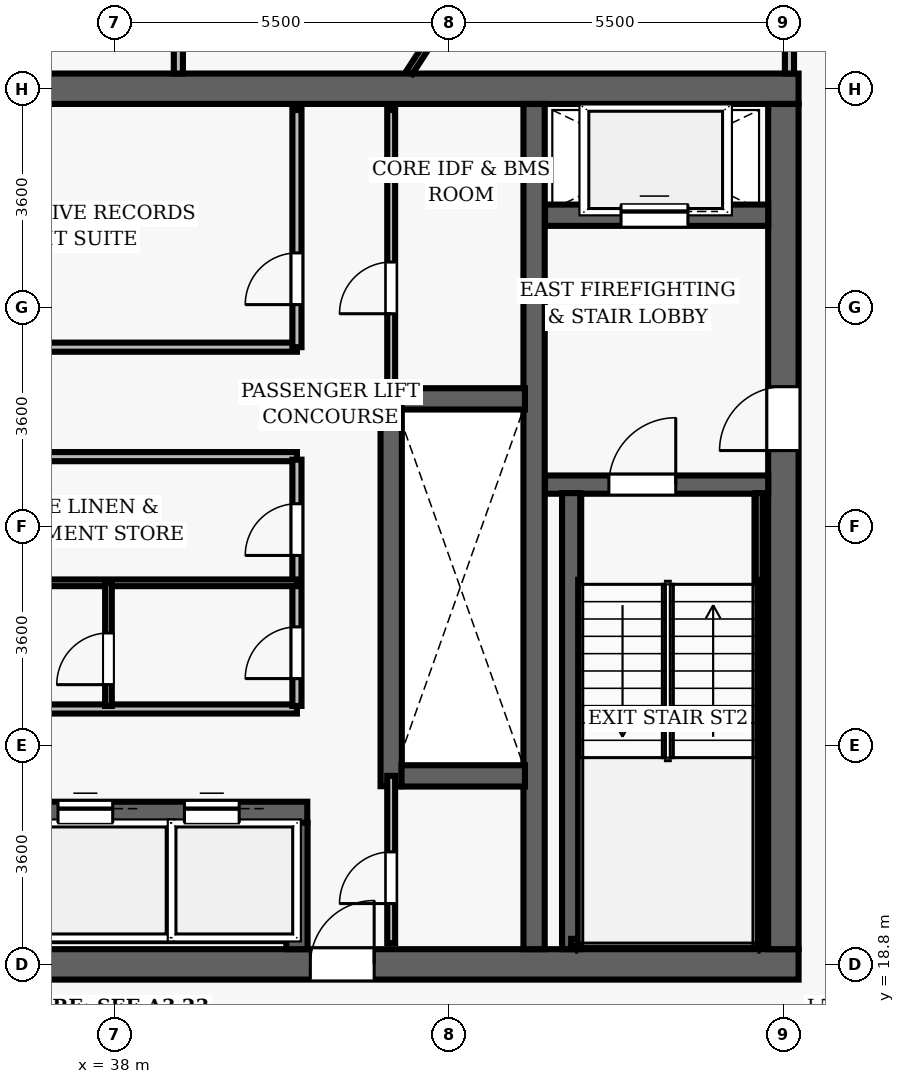
"""IFC4 building model, lengths in metres.
Left out: names, types, materials, properties, quantities, classifications, styles, units other than length and angle.
Written with IfcOpenShell. Run it as: python <this file> out.ifc"""

import sys

from ifc_helpers import new_model, si_unit, direction, frame, frame_2d, origin, place, context, subcontext, project, spatial, rectangle, extrude, element, fill, save


model = new_model("IFC4")
c1 = context("Model", 3, precision=1e-05, world=origin(), true_north=direction((0.0, 1.0)))
c2 = subcontext(c1, "Body", "Model", "MODEL_VIEW")
j1 = project(units=[si_unit("LENGTHUNIT", "METRE"), si_unit("PLANEANGLEUNIT", "RADIAN")], contexts=[c1])
p1 = place(None, origin())
s1 = spatial("IfcSite", under=j1, at=p1, CompositionType="ELEMENT")
p2 = place(p1, origin())
s2 = spatial("IfcBuilding", under=s1, at=p2, CompositionType="ELEMENT")
p3 = place(p2, frame((0.0, 0.0, 217.4)))
s3 = spatial("IfcBuildingStorey", under=s2, at=p3, CompositionType="ELEMENT", Elevation=217.4)
p4 = place(p3, frame((26.75, 18.8, 0.0), z_axis=(0.0, 0.0, 1.0), x_axis=(1.0, 0.0, 0.0)))
e1 = element("IfcWall", 1, at=p4, inside=s3, PredefinedType="SHEAR", context=c2, shape_type="SweptSolid", body=[
    extrude(rectangle(XDim=22.5, YDim=0.5, at=frame_2d((11.25, 0.0))), origin(), (0.0, 0.0, 1.0), 3.85),
])
p5 = place(p4, frame((14.47, 0.0, 0.0)))
e2 = element("IfcOpeningElement", 2, at=p5, cuts=e1, PredefinedType="OPENING", context=c2, shape_type="SweptSolid", body=[
    extrude(rectangle(XDim=1.05, YDim=2.15, at=frame_2d((0.525, 1.075))), frame((0.0, 0.26, 0.0), z_axis=(0.0, -1.0, 0.0), x_axis=(1.0, 0.0, 0.0)), (0.0, 0.0, 1.0), 0.52),
])
p6 = place(p3, frame((26.75, 33.2, 0.0), z_axis=(0.0, 0.0, 1.0), x_axis=(1.0, 0.0, 0.0)))
e3 = element("IfcWall", 3, at=p6, inside=s3, PredefinedType="SHEAR", context=c2, shape_type="SweptSolid", body=[
    extrude(rectangle(XDim=22.5, YDim=0.5, at=frame_2d((11.25, 0.0))), origin(), (0.0, 0.0, 1.0), 3.85),
])
p7 = place(p3, frame((49.0, 19.05, 0.0), z_axis=(0.0, 0.0, 1.0), x_axis=(0.0, 1.0, 0.0)))
e4 = element("IfcWall", 4, at=p7, inside=s3, PredefinedType="SHEAR", context=c2, shape_type="SweptSolid", body=[
    extrude(rectangle(XDim=13.9, YDim=0.5, at=frame_2d((6.95, 0.0))), origin(), (0.0, 0.0, 1.0), 3.85),
])
p8 = place(p7, frame((8.2, 0.0, 0.0)))
e5 = element("IfcOpeningElement", 5, at=p8, cuts=e4, PredefinedType="OPENING", context=c2, shape_type="SweptSolid", body=[
    extrude(rectangle(XDim=1.05, YDim=2.15, at=frame_2d((0.525, 1.075))), frame((0.0, 0.26, 0.0), z_axis=(0.0, -1.0, 0.0), x_axis=(1.0, 0.0, 0.0)), (0.0, 0.0, 1.0), 0.52),
])
p9 = place(p3, frame((44.9, 19.05, 0.0), z_axis=(0.0, 0.0, 1.0), x_axis=(0.0, 1.0, 0.0)))
e6 = element("IfcWall", 6, at=p9, inside=s3, PredefinedType="SHEAR", context=c2, shape_type="SweptSolid", body=[
    extrude(rectangle(XDim=13.9, YDim=0.35, at=frame_2d((6.95, 0.0))), origin(), (0.0, 0.0, 1.0), 3.85),
])
p10 = place(p3, frame((45.08, 26.69, 0.0), z_axis=(0.0, 0.0, 1.0), x_axis=(1.0, 0.0, 0.0)))
e7 = element("IfcWall", 7, at=p10, inside=s3, PredefinedType="SHEAR", context=c2, shape_type="SweptSolid", body=[
    extrude(rectangle(XDim=3.67, YDim=0.3, at=frame_2d((1.835, 0.0))), origin(), (0.0, 0.0, 1.0), 3.85),
])
p11 = place(p10, frame((1.05, 0.0, 0.0)))
e8 = element("IfcOpeningElement", 8, at=p11, cuts=e7, PredefinedType="OPENING", context=c2, shape_type="SweptSolid", body=[
    extrude(rectangle(XDim=1.1, YDim=2.15, at=frame_2d((0.55, 1.075))), frame((0.0, 0.16, 0.0), z_axis=(0.0, -1.0, 0.0), x_axis=(1.0, 0.0, 0.0)), (0.0, 0.0, 1.0), 0.32),
])
p12 = place(p3, frame((45.51, 19.05, 0.0), z_axis=(0.0, 0.0, 1.0), x_axis=(0.0, 1.0, 0.0)))
e9 = element("IfcWall", 9, at=p12, inside=s3, PredefinedType="SHEAR", context=c2, shape_type="SweptSolid", body=[
    extrude(rectangle(XDim=7.5, YDim=0.3, at=frame_2d((3.75, 0.0))), origin(), (0.0, 0.0, 1.0), 3.85),
])
p13 = place(p3, frame((48.605, 19.1, 0.0), z_axis=(0.0, 0.0, 1.0), x_axis=(0.0, 1.0, 0.0)))
e10 = element("IfcWall", 10, at=p13, inside=s3, PredefinedType="SHEAR", context=c2, shape_type="SweptSolid", body=[
    extrude(rectangle(XDim=7.45, YDim=0.12, at=frame_2d((3.725, 0.0))), origin(), (0.0, 0.0, 1.0), 3.85),
])
p14 = place(p3, frame((45.51, 19.16, 0.0), z_axis=(0.0, 0.0, 1.0), x_axis=(1.0, 0.0, 0.0)))
e11 = element("IfcWall", 11, at=p14, inside=s3, PredefinedType="SHEAR", context=c2, shape_type="SweptSolid", body=[
    extrude(rectangle(XDim=3.095, YDim=0.12, at=frame_2d((1.547, 0.0))), origin(), (0.0, 0.0, 1.0), 3.85),
])
p15 = place(p3, frame((45.08, 31.12, 0.0), z_axis=(0.0, 0.0, 1.0), x_axis=(1.0, 0.0, 0.0)))
e12 = element("IfcWall", 12, at=p15, inside=s3, PredefinedType="SHEAR", context=c2, shape_type="SweptSolid", body=[
    extrude(rectangle(XDim=3.67, YDim=0.35, at=frame_2d((1.835, 0.0))), origin(), (0.0, 0.0, 1.0), 3.035),
])
p16 = place(p15, frame((1.25, 0.0, 0.0)))
e13 = element("IfcOpeningElement", 13, at=p16, cuts=e12, PredefinedType="OPENING", context=c2, shape_type="SweptSolid", body=[
    extrude(rectangle(XDim=1.1, YDim=2.15, at=frame_2d((0.55, 1.075))), frame((0.0, 0.185, 0.0), z_axis=(0.0, -1.0, 0.0), x_axis=(1.0, 0.0, 0.0)), (0.0, 0.0, 1.0), 0.37),
])
p17 = place(p3, frame((42.55, 21.73, 0.0), z_axis=(0.0, 0.0, 1.0), x_axis=(0.0, 1.0, 0.0)))
e14 = element("IfcWall", 14, at=p17, inside=s3, PredefinedType="SHEAR", context=c2, shape_type="SweptSolid", body=[
    extrude(rectangle(XDim=6.54, YDim=0.35, at=frame_2d((3.27, 0.0))), origin(), (0.0, 0.0, 1.0), 3.035),
])
for number, where, z_axis, x_axis in (
    (15, (42.72, 21.9, 0.0), (0.0, 0.0, 1.0), (1.0, 0.0, 0.0)),
    (16, (42.72, 28.1, 0.0), (0.0, 0.0, 1.0), (1.0, 0.0, 0.0)),
):
    element("IfcWall", number, at=place(p3, frame(where, z_axis=z_axis, x_axis=x_axis)), inside=s3, PredefinedType="SHEAR", context=c2, shape_type="SweptSolid", body=[
        extrude(rectangle(XDim=2.03, YDim=0.35, at=frame_2d((1.015, 0.0))), origin(), (0.0, 0.0, 1.0), 3.035),
    ])
p18 = place(p3, frame((34.49, 21.3, 0.0), z_axis=(0.0, 0.0, 1.0), x_axis=(1.0, 0.0, 0.0)))
e17 = element("IfcWall", 17, at=p18, inside=s3, PredefinedType="SHEAR", context=c2, shape_type="SweptSolid", body=[
    extrude(rectangle(XDim=6.68, YDim=0.35, at=frame_2d((3.34, 0.0))), origin(), (0.0, 0.0, 1.0), 3.035),
])
p19 = place(p18, frame((0.5, 0.0, 0.0)))
e18 = element("IfcOpeningElement", 18, at=p19, cuts=e17, PredefinedType="OPENING", context=c2, shape_type="SweptSolid", body=[
    extrude(rectangle(XDim=0.9, YDim=2.15, at=frame_2d((0.45, 1.075))), frame((0.0, 0.185, 0.0), z_axis=(0.0, -1.0, 0.0), x_axis=(1.0, 0.0, 0.0)), (0.0, 0.0, 1.0), 0.37),
])
p20 = place(p18, frame((2.58, 0.0, 0.0)))
e19 = element("IfcOpeningElement", 19, at=p20, cuts=e17, PredefinedType="OPENING", context=c2, shape_type="SweptSolid", body=[
    extrude(rectangle(XDim=0.9, YDim=2.15, at=frame_2d((0.45, 1.075))), frame((0.0, 0.185, 0.0), z_axis=(0.0, -1.0, 0.0), x_axis=(1.0, 0.0, 0.0)), (0.0, 0.0, 1.0), 0.37),
])
p21 = place(p18, frame((4.66, 0.0, 0.0)))
e20 = element("IfcOpeningElement", 20, at=p21, cuts=e17, PredefinedType="OPENING", context=c2, shape_type="SweptSolid", body=[
    extrude(rectangle(XDim=0.9, YDim=2.15, at=frame_2d((0.45, 1.075))), frame((0.0, 0.185, 0.0), z_axis=(0.0, -1.0, 0.0), x_axis=(1.0, 0.0, 0.0)), (0.0, 0.0, 1.0), 0.37),
])
p22 = place(p3, frame((41.0, 19.05, 0.0), z_axis=(0.0, 0.0, 1.0), x_axis=(0.0, 1.0, 0.0)))
e21 = element("IfcWall", 21, at=p22, inside=s3, PredefinedType="SHEAR", context=c2, shape_type="SweptSolid", body=[
    extrude(rectangle(XDim=2.08, YDim=0.35, at=frame_2d((1.04, 0.0))), origin(), (0.0, 0.0, 1.0), 3.035),
])
p23 = place(p3, frame((34.75, 23.0, 0.0), z_axis=(0.0, 0.0, 1.0), x_axis=(1.0, 0.0, 0.0)))
e22 = element("IfcWall", 22, at=p23, inside=s3, PredefinedType="PARTITIONING", context=c2, shape_type="SweptSolid", body=[
    extrude(rectangle(XDim=6.25, YDim=0.15, at=frame_2d((3.125, 0.0))), origin(), (0.0, 0.0, 1.0), 3.035),
])
for number, where, z_axis, x_axis in (
    (23, (34.64, 27.15, 0.0), (0.0, 0.0, 1.0), (1.0, 0.0, 0.0)),
    (24, (34.64, 28.95, 0.0), (0.0, 0.0, 1.0), (1.0, 0.0, 0.0)),
):
    element("IfcWall", number, at=place(p3, frame(where, z_axis=z_axis, x_axis=x_axis)), inside=s3, PredefinedType="PARTITIONING", context=c2, shape_type="SweptSolid", body=[
        extrude(rectangle(XDim=6.36, YDim=0.15, at=frame_2d((3.18, 0.0))), origin(), (0.0, 0.0, 1.0), 3.035),
    ])
p24 = place(p3, frame((41.0, 28.95, 0.0), z_axis=(0.0, 0.0, 1.0), x_axis=(0.0, 1.0, 0.0)))
e25 = element("IfcWall", 25, at=p24, inside=s3, PredefinedType="PARTITIONING", context=c2, shape_type="SweptSolid", body=[
    extrude(rectangle(XDim=3.9, YDim=0.15, at=frame_2d((1.95, 0.0))), origin(), (0.0, 0.0, 1.0), 3.035),
])
p25 = place(p24, frame((0.7, 0.0, 0.0)))
e26 = element("IfcOpeningElement", 26, at=p25, cuts=e25, PredefinedType="OPENING", context=c2, shape_type="SweptSolid", body=[
    extrude(rectangle(XDim=0.85, YDim=2.1, at=frame_2d((0.425, 1.05))), frame((0.0, 0.085, 0.0), z_axis=(0.0, -1.0, 0.0), x_axis=(1.0, 0.0, 0.0)), (0.0, 0.0, 1.0), 0.17),
])
p26 = place(p3, frame((41.0, 23.05, 0.0), z_axis=(0.0, 0.0, 1.0), x_axis=(0.0, 1.0, 0.0)))
e27 = element("IfcWall", 27, at=p26, inside=s3, PredefinedType="PARTITIONING", context=c2, shape_type="SweptSolid", body=[
    extrude(rectangle(XDim=4.05, YDim=0.15, at=frame_2d((2.025, 0.0))), origin(), (0.0, 0.0, 1.0), 3.035),
])
p27 = place(p26, frame((2.475, 0.0, 0.0)))
e28 = element("IfcOpeningElement", 28, at=p27, cuts=e27, PredefinedType="OPENING", context=c2, shape_type="SweptSolid", body=[
    extrude(rectangle(XDim=0.85, YDim=2.1, at=frame_2d((0.425, 1.05))), frame((0.0, 0.085, 0.0), z_axis=(0.0, -1.0, 0.0), x_axis=(1.0, 0.0, 0.0)), (0.0, 0.0, 1.0), 0.17),
])
p28 = place(p26, frame((0.45, 0.0, 0.0)))
e29 = element("IfcOpeningElement", 29, at=p28, cuts=e27, PredefinedType="OPENING", context=c2, shape_type="SweptSolid", body=[
    extrude(rectangle(XDim=0.85, YDim=2.1, at=frame_2d((0.425, 1.05))), frame((0.0, 0.085, 0.0), z_axis=(0.0, -1.0, 0.0), x_axis=(1.0, 0.0, 0.0)), (0.0, 0.0, 1.0), 0.17),
])
p29 = place(p3, frame((34.75, 25.075, 0.0), z_axis=(0.0, 0.0, 1.0), x_axis=(1.0, 0.0, 0.0)))
e30 = element("IfcWall", 30, at=p29, inside=s3, PredefinedType="PARTITIONING", context=c2, shape_type="SweptSolid", body=[
    extrude(rectangle(XDim=6.25, YDim=0.11, at=frame_2d((3.125, 0.0))), origin(), (0.0, 0.0, 1.0), 3.035),
])
p30 = place(p3, frame((37.9, 23.05, 0.0), z_axis=(0.0, 0.0, 1.0), x_axis=(0.0, 1.0, 0.0)))
e31 = element("IfcWall", 31, at=p30, inside=s3, PredefinedType="PARTITIONING", context=c2, shape_type="SweptSolid", body=[
    extrude(rectangle(XDim=2.025, YDim=0.11, at=frame_2d((1.012, 0.0))), origin(), (0.0, 0.0, 1.0), 3.035),
])
p31 = place(p30, frame((0.35, 0.0, 0.0)))
e32 = element("IfcOpeningElement", 32, at=p31, cuts=e31, PredefinedType="OPENING", context=c2, shape_type="SweptSolid", body=[
    extrude(rectangle(XDim=0.85, YDim=2.1, at=frame_2d((0.425, 1.05))), frame((0.0, 0.065, 0.0), z_axis=(0.0, -1.0, 0.0), x_axis=(1.0, 0.0, 0.0)), (0.0, 0.0, 1.0), 0.13),
])
p32 = place(p3, frame((42.55, 28.1, 0.0), z_axis=(0.0, 0.0, 1.0), x_axis=(0.0, 1.0, 0.0)))
e33 = element("IfcWall", 33, at=p32, inside=s3, PredefinedType="PARTITIONING", context=c2, shape_type="SweptSolid", body=[
    extrude(rectangle(XDim=4.75, YDim=0.13, at=frame_2d((2.375, 0.0))), origin(), (0.0, 0.0, 1.0), 3.035),
])
p33 = place(p32, frame((1.4, 0.0, 0.0)))
e34 = element("IfcOpeningElement", 34, at=p33, cuts=e33, PredefinedType="OPENING", context=c2, shape_type="SweptSolid", body=[
    extrude(rectangle(XDim=0.85, YDim=2.1, at=frame_2d((0.425, 1.05))), frame((0.0, 0.075, 0.0), z_axis=(0.0, -1.0, 0.0), x_axis=(1.0, 0.0, 0.0)), (0.0, 0.0, 1.0), 0.15),
])
p34 = place(p3, frame((42.55, 19.15, 0.0), z_axis=(0.0, 0.0, 1.0), x_axis=(0.0, 1.0, 0.0)))
e35 = element("IfcWall", 35, at=p34, inside=s3, PredefinedType="PARTITIONING", context=c2, shape_type="SweptSolid", body=[
    extrude(rectangle(XDim=2.75, YDim=0.13, at=frame_2d((1.375, 0.0))), origin(), (0.0, 0.0, 1.0), 3.035),
])
p35 = place(p34, frame((0.65, 0.0, 0.0)))
e36 = element("IfcOpeningElement", 36, at=p35, cuts=e35, PredefinedType="OPENING", context=c2, shape_type="SweptSolid", body=[
    extrude(rectangle(XDim=0.85, YDim=2.1, at=frame_2d((0.425, 1.05))), frame((0.0, 0.075, 0.0), z_axis=(0.0, -1.0, 0.0), x_axis=(1.0, 0.0, 0.0)), (0.0, 0.0, 1.0), 0.15),
])
p36 = place(p3, frame((49.1, 33.45, 0.0), z_axis=(0.0, 0.0, 1.0), x_axis=(0.0, 1.0, 0.0)))
e37 = element("IfcWall", 37, at=p36, inside=s3, PredefinedType="PARTITIONING", context=c2, shape_type="SweptSolid", body=[
    extrude(rectangle(XDim=7.95, YDim=0.15, at=frame_2d((3.975, 0.0))), origin(), (0.0, 0.0, 1.0), 3.035),
])
p37 = place(p3, frame((39.05, 33.45, 0.0), z_axis=(0.0, 0.0, 1.0), x_axis=(0.0, 1.0, 0.0)))
e38 = element("IfcWall", 38, at=p37, inside=s3, PredefinedType="PARTITIONING", context=c2, shape_type="SweptSolid", body=[
    extrude(rectangle(XDim=6.95, YDim=0.15, at=frame_2d((3.475, 0.0))), origin(), (0.0, 0.0, 1.0), 3.035),
])
p38 = place(p37, frame((1.262, 0.0, 0.0)))
e39 = element("IfcOpeningElement", 39, at=p38, cuts=e38, PredefinedType="OPENING", context=c2, shape_type="SweptSolid", body=[
    extrude(rectangle(XDim=0.95, YDim=2.15, at=frame_2d((0.475, 1.075))), frame((0.0, 0.085, 0.0), z_axis=(0.0, -1.0, 0.0), x_axis=(1.0, 0.0, 0.0)), (0.0, 0.0, 1.0), 0.17),
])
p39 = place(p3, frame((42.851, 33.47, 0.0), z_axis=(0.0, 0.0, 1.0), x_axis=(0.544631367438, 0.838675547278, 0.0)))
e40 = element("IfcWall", 40, at=p39, inside=s3, PredefinedType="PARTITIONING", context=c2, shape_type="SweptSolid", body=[
    extrude(rectangle(XDim=12.646, YDim=0.11, at=frame_2d((6.323, 0.0))), origin(), (0.0, 0.0, 1.0), 3.035),
])
p40 = place(p11, origin())
e41 = element("IfcDoor", 41, at=p40, inside=s3, OperationType="SINGLE_SWING_RIGHT", PredefinedType="DOOR", context=c2, shape_type="SweptSolid", body=[
    extrude(rectangle(XDim=1.1, YDim=2.15, at=frame_2d((0.55, 1.075))), frame((0.0, 0.025, 0.0), z_axis=(0.0, -1.0, 0.0), x_axis=(1.0, 0.0, 0.0)), (0.0, 0.0, 1.0), 0.05),
])
fill(e8, e41)
p41 = place(p8, origin())
e42 = element("IfcDoor", 42, at=p41, inside=s3, OperationType="SINGLE_SWING_LEFT", PredefinedType="DOOR", context=c2, shape_type="SweptSolid", body=[
    extrude(rectangle(XDim=1.05, YDim=2.15, at=frame_2d((0.525, 1.075))), frame((0.0, 0.025, 0.0), z_axis=(0.0, -1.0, 0.0), x_axis=(1.0, 0.0, 0.0)), (0.0, 0.0, 1.0), 0.05),
])
fill(e5, e42)
p42 = place(p5, origin())
e43 = element("IfcDoor", 43, at=p42, inside=s3, OperationType="SINGLE_SWING_RIGHT", PredefinedType="DOOR", context=c2, shape_type="SweptSolid", body=[
    extrude(rectangle(XDim=1.05, YDim=2.15, at=frame_2d((0.525, 1.075))), frame((0.0, 0.025, 0.0), z_axis=(0.0, -1.0, 0.0), x_axis=(1.0, 0.0, 0.0)), (0.0, 0.0, 1.0), 0.05),
])
fill(e2, e43)
p43 = place(p25, origin())
e44 = element("IfcDoor", 44, at=p43, inside=s3, OperationType="SINGLE_SWING_LEFT", PredefinedType="DOOR", context=c2, shape_type="SweptSolid", body=[
    extrude(rectangle(XDim=0.85, YDim=2.1, at=frame_2d((0.425, 1.05))), frame((0.0, 0.025, 0.0), z_axis=(0.0, -1.0, 0.0), x_axis=(1.0, 0.0, 0.0)), (0.0, 0.0, 1.0), 0.05),
])
fill(e26, e44)
p44 = place(p27, origin())
e45 = element("IfcDoor", 45, at=p44, inside=s3, OperationType="SINGLE_SWING_LEFT", PredefinedType="DOOR", context=c2, shape_type="SweptSolid", body=[
    extrude(rectangle(XDim=0.85, YDim=2.1, at=frame_2d((0.425, 1.05))), frame((0.0, 0.025, 0.0), z_axis=(0.0, -1.0, 0.0), x_axis=(1.0, 0.0, 0.0)), (0.0, 0.0, 1.0), 0.05),
])
fill(e28, e45)
p45 = place(p28, origin())
e46 = element("IfcDoor", 46, at=p45, inside=s3, OperationType="SINGLE_SWING_LEFT", PredefinedType="DOOR", context=c2, shape_type="SweptSolid", body=[
    extrude(rectangle(XDim=0.85, YDim=2.1, at=frame_2d((0.425, 1.05))), frame((0.0, 0.025, 0.0), z_axis=(0.0, -1.0, 0.0), x_axis=(1.0, 0.0, 0.0)), (0.0, 0.0, 1.0), 0.05),
])
fill(e29, e46)
p46 = place(p31, origin())
e47 = element("IfcDoor", 47, at=p46, inside=s3, OperationType="SINGLE_SWING_LEFT", PredefinedType="DOOR", context=c2, shape_type="SweptSolid", body=[
    extrude(rectangle(XDim=0.85, YDim=2.1, at=frame_2d((0.425, 1.05))), frame((0.0, 0.025, 0.0), z_axis=(0.0, -1.0, 0.0), x_axis=(1.0, 0.0, 0.0)), (0.0, 0.0, 1.0), 0.05),
])
fill(e32, e47)
p47 = place(p33, origin())
e48 = element("IfcDoor", 48, at=p47, inside=s3, OperationType="SINGLE_SWING_LEFT", PredefinedType="DOOR", context=c2, shape_type="SweptSolid", body=[
    extrude(rectangle(XDim=0.85, YDim=2.1, at=frame_2d((0.425, 1.05))), frame((0.0, 0.025, 0.0), z_axis=(0.0, -1.0, 0.0), x_axis=(1.0, 0.0, 0.0)), (0.0, 0.0, 1.0), 0.05),
])
fill(e34, e48)
p48 = place(p35, origin())
e49 = element("IfcDoor", 49, at=p48, inside=s3, OperationType="SINGLE_SWING_LEFT", PredefinedType="DOOR", context=c2, shape_type="SweptSolid", body=[
    extrude(rectangle(XDim=0.85, YDim=2.1, at=frame_2d((0.425, 1.05))), frame((0.0, 0.025, 0.0), z_axis=(0.0, -1.0, 0.0), x_axis=(1.0, 0.0, 0.0)), (0.0, 0.0, 1.0), 0.05),
])
fill(e36, e49)
p49 = place(p20, origin())
e50 = element("IfcDoor", 50, at=p49, inside=s3, OperationType="SLIDING_TO_LEFT", PredefinedType="DOOR", context=c2, shape_type="SweptSolid", body=[
    extrude(rectangle(XDim=0.9, YDim=2.15, at=frame_2d((0.45, 1.075))), frame((0.0, 0.025, 0.0), z_axis=(0.0, -1.0, 0.0), x_axis=(1.0, 0.0, 0.0)), (0.0, 0.0, 1.0), 0.05),
])
fill(e19, e50)
p50 = place(p21, origin())
e51 = element("IfcDoor", 51, at=p50, inside=s3, OperationType="SLIDING_TO_LEFT", PredefinedType="DOOR", context=c2, shape_type="SweptSolid", body=[
    extrude(rectangle(XDim=0.9, YDim=2.15, at=frame_2d((0.45, 1.075))), frame((0.0, 0.025, 0.0), z_axis=(0.0, -1.0, 0.0), x_axis=(1.0, 0.0, 0.0)), (0.0, 0.0, 1.0), 0.05),
])
fill(e20, e51)
p51 = place(p16, origin())
e52 = element("IfcDoor", 52, at=p51, inside=s3, OperationType="SLIDING_TO_LEFT", PredefinedType="DOOR", context=c2, shape_type="SweptSolid", body=[
    extrude(rectangle(XDim=1.1, YDim=2.15, at=frame_2d((0.55, 1.075))), frame((0.0, 0.025, 0.0), z_axis=(0.0, -1.0, 0.0), x_axis=(1.0, 0.0, 0.0)), (0.0, 0.0, 1.0), 0.05),
])
fill(e13, e52)
save(model, sys.argv[1])
